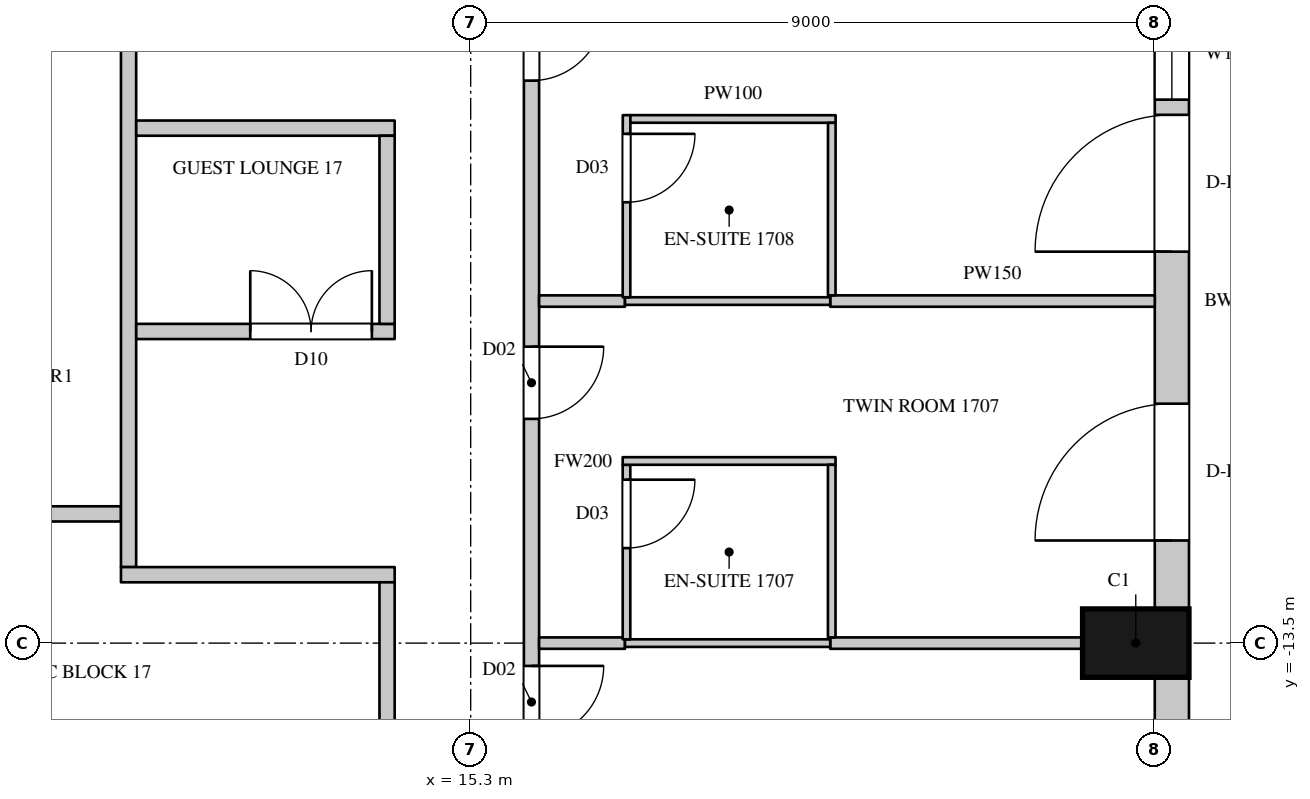
"""IFC4 building model, lengths in metres.
Left out: names, types, materials, properties, quantities, classifications, styles, units other than length and angle.
Written with IfcOpenShell. Run it as: python <this file> out.ifc"""

import sys

from ifc_helpers import new_model, si_unit, direction, frame, frame_2d, origin, origin_2d, place, context, subcontext, project, spatial, rectangle, extrude, element, fill, save


model = new_model("IFC4")
c1 = context("Model", 3, precision=1e-05, world=origin(), true_north=direction((0.0, 1.0)))
c2 = subcontext(c1, "Body", "Model", "MODEL_VIEW")
j1 = project(units=[si_unit("LENGTHUNIT", "METRE"), si_unit("PLANEANGLEUNIT", "RADIAN")], contexts=[c1])
p1 = place(None, origin())
s1 = spatial("IfcSite", under=j1, at=p1, CompositionType="ELEMENT")
p2 = place(p1, origin())
s2 = spatial("IfcBuilding", under=s1, at=p2, CompositionType="ELEMENT")
p3 = place(p2, frame((0.0, 0.0, 91.5)))
s3 = spatial("IfcBuildingStorey", under=s2, at=p3, CompositionType="ELEMENT", Elevation=91.5)
p4 = place(p3, frame((24.05, -13.5, 0.0), z_axis=(0.0, 0.0, 1.0), x_axis=(0.0, 1.0, 0.0)))
e1 = element("IfcColumn", 1, at=p4, inside=s3, PredefinedType="COLUMN", context=c2, shape_type="SweptSolid", body=[
    extrude(rectangle(XDim=0.9, YDim=1.4, at=origin_2d()), origin(), (0.0, 0.0, 1.0), 3.6),
])
p5 = place(p3, frame((24.525, -19.064, 0.0), z_axis=(0.0, 0.0, 1.0), x_axis=(0.0, 1.0, 0.0)))
e2 = element("IfcWall", 2, at=p5, inside=s3, PredefinedType="SOLIDWALL", context=c2, shape_type="SweptSolid", body=[
    extrude(rectangle(XDim=5.114, YDim=0.45, at=frame_2d((2.557, 0.0))), origin(), (0.0, 0.0, 1.0), 3.3),
])
p6 = place(p5, frame((1.114, 0.0, 1.05)))
e3 = element("IfcOpeningElement", 3, at=p6, cuts=e2, PredefinedType="OPENING", context=c2, shape_type="SweptSolid", body=[
    extrude(rectangle(XDim=2.7, YDim=2.0, at=frame_2d((1.35, 1.0))), frame((0.0, 0.235, 0.0), z_axis=(0.0, -1.0, 0.0), x_axis=(1.0, 0.0, 0.0)), (0.0, 0.0, 1.0), 0.47),
])
p7 = place(p3, frame((24.525, -13.05, 0.0), z_axis=(0.0, 0.0, 1.0), x_axis=(0.0, 1.0, 0.0)))
e4 = element("IfcWall", 4, at=p7, inside=s3, PredefinedType="SOLIDWALL", context=c2, shape_type="SweptSolid", body=[
    extrude(rectangle(XDim=8.1, YDim=0.45, at=frame_2d((4.05, 0.0))), origin(), (0.0, 0.0, 1.0), 3.3),
])
p8 = place(p7, frame((0.9, 0.0, 0.0)))
e5 = element("IfcOpeningElement", 5, at=p8, cuts=e4, PredefinedType="OPENING", context=c2, shape_type="SweptSolid", body=[
    extrude(rectangle(XDim=1.8, YDim=2.4, at=frame_2d((0.9, 1.2))), frame((0.0, 0.235, 0.0), z_axis=(0.0, -1.0, 0.0), x_axis=(1.0, 0.0, 0.0)), (0.0, 0.0, 1.0), 0.47),
])
p9 = place(p7, frame((4.7, 0.0, 0.0)))
e6 = element("IfcOpeningElement", 6, at=p9, cuts=e4, PredefinedType="OPENING", context=c2, shape_type="SweptSolid", body=[
    extrude(rectangle(XDim=1.8, YDim=2.4, at=frame_2d((0.9, 1.2))), frame((0.0, 0.235, 0.0), z_axis=(0.0, -1.0, 0.0), x_axis=(1.0, 0.0, 0.0)), (0.0, 0.0, 1.0), 0.47),
])
p10 = place(p7, frame((6.7, 0.0, 1.05)))
e7 = element("IfcOpeningElement", 7, at=p10, cuts=e4, PredefinedType="OPENING", context=c2, shape_type="SweptSolid", body=[
    extrude(rectangle(XDim=1.2, YDim=2.0, at=frame_2d((0.6, 1.0))), frame((0.0, 0.235, 0.0), z_axis=(0.0, -1.0, 0.0), x_axis=(1.0, 0.0, 0.0)), (0.0, 0.0, 1.0), 0.47),
])
p11 = place(p3, frame((-8.7, -11.8, 0.0), z_axis=(0.0, 0.0, 1.0), x_axis=(1.0, 0.0, 0.0)))
e8 = element("IfcWall", 8, at=p11, inside=s3, PredefinedType="PARTITIONING", context=c2, shape_type="SweptSolid", body=[
    extrude(rectangle(XDim=19.4, YDim=0.2, at=frame_2d((9.7, 0.0))), origin(), (0.0, 0.0, 1.0), 3.3),
])
p12 = place(p11, frame((6.95, 0.0, 0.0)))
e9 = element("IfcOpeningElement", 9, at=p12, cuts=e8, PredefinedType="OPENING", context=c2, shape_type="SweptSolid", body=[
    extrude(rectangle(XDim=1.5, YDim=2.2, at=frame_2d((0.75, 1.1))), frame((0.0, 0.11, 0.0), z_axis=(0.0, -1.0, 0.0), x_axis=(1.0, 0.0, 0.0)), (0.0, 0.0, 1.0), 0.22),
])
p13 = place(p3, frame((10.799, -12.5, 0.0), z_axis=(0.0, 0.0, 1.0), x_axis=(0.0, 1.0, 0.0)))
e10 = element("IfcWall", 10, at=p13, inside=s3, PredefinedType="PARTITIONING", context=c2, shape_type="SweptSolid", body=[
    extrude(rectangle(XDim=24.2, YDim=0.2, at=frame_2d((12.1, 0.0))), origin(), (0.0, 0.0, 1.0), 3.3),
])
p14 = place(p13, frame((13.15, 0.0, 0.0)))
e11 = element("IfcOpeningElement", 11, at=p14, cuts=e10, PredefinedType="OPENING", context=c2, shape_type="SweptSolid", body=[
    extrude(rectangle(XDim=1.5, YDim=2.2, at=frame_2d((0.75, 1.1))), frame((0.0, 0.11, 0.0), z_axis=(0.0, -1.0, 0.0), x_axis=(1.0, 0.0, 0.0)), (0.0, 0.0, 1.0), 0.22),
])
p15 = place(p3, frame((10.699, -12.6, 0.0), z_axis=(0.0, 0.0, 1.0), x_axis=(1.0, 0.0, 0.0)))
e12 = element("IfcWall", 12, at=p15, inside=s3, PredefinedType="PARTITIONING", context=c2, shape_type="SweptSolid", body=[
    extrude(rectangle(XDim=3.601, YDim=0.2, at=frame_2d((1.801, 0.0))), origin(), (0.0, 0.0, 1.0), 3.3),
])
p16 = place(p3, frame((10.9, -9.4, 0.0), z_axis=(0.0, 0.0, 1.0), x_axis=(1.0, 0.0, 0.0)))
e13 = element("IfcWall", 13, at=p16, inside=s3, PredefinedType="PARTITIONING", context=c2, shape_type="SweptSolid", body=[
    extrude(rectangle(XDim=3.4, YDim=0.2, at=frame_2d((1.7, 0.0))), origin(), (0.0, 0.0, 1.0), 3.3),
])
p17 = place(p16, frame((1.5, 0.0, 0.0)))
e14 = element("IfcOpeningElement", 14, at=p17, cuts=e13, PredefinedType="OPENING", context=c2, shape_type="SweptSolid", body=[
    extrude(rectangle(XDim=1.6, YDim=2.4, at=frame_2d((0.8, 1.2))), frame((0.0, 0.11, 0.0), z_axis=(0.0, -1.0, 0.0), x_axis=(1.0, 0.0, 0.0)), (0.0, 0.0, 1.0), 0.22),
])
p18 = place(p3, frame((10.9, -6.725, 0.0), z_axis=(0.0, 0.0, 1.0), x_axis=(1.0, 0.0, 0.0)))
e15 = element("IfcWall", 15, at=p18, inside=s3, PredefinedType="PARTITIONING", context=c2, shape_type="SweptSolid", body=[
    extrude(rectangle(XDim=3.4, YDim=0.2, at=frame_2d((1.7, 0.0))), origin(), (0.0, 0.0, 1.0), 3.3),
])
p19 = place(p3, frame((14.2, -15.5, 0.0), z_axis=(0.0, 0.0, 1.0), x_axis=(0.0, 1.0, 0.0)))
e16 = element("IfcWall", 16, at=p19, inside=s3, PredefinedType="PARTITIONING", context=c2, shape_type="SweptSolid", body=[
    extrude(rectangle(XDim=2.8, YDim=0.2, at=frame_2d((1.4, 0.0))), origin(), (0.0, 0.0, 1.0), 3.3),
])
p20 = place(p3, frame((14.2, -9.3, 0.0), z_axis=(0.0, 0.0, 1.0), x_axis=(0.0, 1.0, 0.0)))
e17 = element("IfcWall", 17, at=p20, inside=s3, PredefinedType="PARTITIONING", context=c2, shape_type="SweptSolid", body=[
    extrude(rectangle(XDim=2.475, YDim=0.2, at=frame_2d((1.238, 0.0))), origin(), (0.0, 0.0, 1.0), 3.3),
])
p21 = place(p3, frame((16.1, -17.5, 0.0), z_axis=(0.0, 0.0, 1.0), x_axis=(0.0, 1.0, 0.0)))
e18 = element("IfcWall", 18, at=p21, inside=s3, PredefinedType="PARTITIONING", context=c2, shape_type="SweptSolid", body=[
    extrude(rectangle(XDim=12.75, YDim=0.2, at=frame_2d((6.375, 0.0))), origin(), (0.0, 0.0, 1.0), 3.3),
])
p22 = place(p21, frame((2.75, 0.0, 0.0)))
e19 = element("IfcOpeningElement", 19, at=p22, cuts=e18, PredefinedType="OPENING", context=c2, shape_type="SweptSolid", body=[
    extrude(rectangle(XDim=0.95, YDim=2.2, at=frame_2d((0.475, 1.1))), frame((0.0, 0.11, 0.0), z_axis=(0.0, -1.0, 0.0), x_axis=(1.0, 0.0, 0.0)), (0.0, 0.0, 1.0), 0.22),
])
p23 = place(p21, frame((6.95, 0.0, 0.0)))
e20 = element("IfcOpeningElement", 20, at=p23, cuts=e18, PredefinedType="OPENING", context=c2, shape_type="SweptSolid", body=[
    extrude(rectangle(XDim=0.95, YDim=2.2, at=frame_2d((0.475, 1.1))), frame((0.0, 0.11, 0.0), z_axis=(0.0, -1.0, 0.0), x_axis=(1.0, 0.0, 0.0)), (0.0, 0.0, 1.0), 0.22),
])
p24 = place(p21, frame((11.4, 0.0, 0.0)))
e21 = element("IfcOpeningElement", 21, at=p24, cuts=e18, PredefinedType="OPENING", context=c2, shape_type="SweptSolid", body=[
    extrude(rectangle(XDim=0.95, YDim=2.2, at=frame_2d((0.475, 1.1))), frame((0.0, 0.11, 0.0), z_axis=(0.0, -1.0, 0.0), x_axis=(1.0, 0.0, 0.0)), (0.0, 0.0, 1.0), 0.22),
])
p25 = place(p3, frame((16.2, -13.5, 0.0), z_axis=(0.0, 0.0, 1.0), x_axis=(1.0, 0.0, 0.0)))
e22 = element("IfcWall", 22, at=p25, inside=s3, PredefinedType="PARTITIONING", context=c2, shape_type="SweptSolid", body=[
    extrude(rectangle(XDim=1.13, YDim=0.15, at=frame_2d((0.565, 0.0))), origin(), (0.0, 0.0, 1.0), 3.3),
])
p26 = place(p3, frame((16.2, -9.0, 0.0), z_axis=(0.0, 0.0, 1.0), x_axis=(1.0, 0.0, 0.0)))
e23 = element("IfcWall", 23, at=p26, inside=s3, PredefinedType="PARTITIONING", context=c2, shape_type="SweptSolid", body=[
    extrude(rectangle(XDim=1.13, YDim=0.15, at=frame_2d((0.565, 0.0))), origin(), (0.0, 0.0, 1.0), 2.65),
])
p27 = place(p3, frame((20.03, -13.5, 0.0), z_axis=(0.0, 0.0, 1.0), x_axis=(1.0, 0.0, 0.0)))
e24 = element("IfcWall", 24, at=p27, inside=s3, PredefinedType="PARTITIONING", context=c2, shape_type="SweptSolid", body=[
    extrude(rectangle(XDim=3.32, YDim=0.15, at=frame_2d((1.66, 0.0))), origin(), (0.0, 0.0, 1.0), 3.3),
])
p28 = place(p3, frame((20.03, -9.0, 0.0), z_axis=(0.0, 0.0, 1.0), x_axis=(1.0, 0.0, 0.0)))
e25 = element("IfcWall", 25, at=p28, inside=s3, PredefinedType="PARTITIONING", context=c2, shape_type="SweptSolid", body=[
    extrude(rectangle(XDim=4.27, YDim=0.15, at=frame_2d((2.135, 0.0))), origin(), (0.0, 0.0, 1.0), 2.65),
])
p29 = place(p3, frame((17.33, -13.5, 0.0), z_axis=(0.0, 0.0, 1.0), x_axis=(1.0, 0.0, 0.0)))
e26 = element("IfcWall", 26, at=p29, inside=s3, PredefinedType="PARTITIONING", context=c2, shape_type="SweptSolid", body=[
    extrude(rectangle(XDim=2.7, YDim=0.1, at=frame_2d((1.35, 0.0))), origin(), (0.0, 0.0, 1.0), 3.3),
])
p30 = place(p3, frame((17.33, -9.0, 0.0), z_axis=(0.0, 0.0, 1.0), x_axis=(1.0, 0.0, 0.0)))
e27 = element("IfcWall", 27, at=p30, inside=s3, PredefinedType="PARTITIONING", context=c2, shape_type="SweptSolid", body=[
    extrude(rectangle(XDim=2.7, YDim=0.1, at=frame_2d((1.35, 0.0))), origin(), (0.0, 0.0, 1.0), 2.65),
])
p31 = place(p3, frame((17.35, -13.45, 0.0), z_axis=(0.0, 0.0, 1.0), x_axis=(0.0, 1.0, 0.0)))
e28 = element("IfcWall", 28, at=p31, inside=s3, PredefinedType="PARTITIONING", context=c2, shape_type="SweptSolid", body=[
    extrude(rectangle(XDim=2.296, YDim=0.1, at=frame_2d((1.148, 0.0))), origin(), (0.0, 0.0, 1.0), 3.3),
])
p32 = place(p31, frame((1.2, 0.0, 0.0)))
e29 = element("IfcOpeningElement", 29, at=p32, cuts=e28, PredefinedType="OPENING", context=c2, shape_type="SweptSolid", body=[
    extrude(rectangle(XDim=0.9, YDim=2.2, at=frame_2d((0.45, 1.1))), frame((0.0, 0.06, 0.0), z_axis=(0.0, -1.0, 0.0), x_axis=(1.0, 0.0, 0.0)), (0.0, 0.0, 1.0), 0.12),
])
p33 = place(p3, frame((17.3, -11.104, 0.0), z_axis=(0.0, 0.0, 1.0), x_axis=(1.0, 0.0, 0.0)))
e30 = element("IfcWall", 30, at=p33, inside=s3, PredefinedType="PARTITIONING", context=c2, shape_type="SweptSolid", body=[
    extrude(rectangle(XDim=2.8, YDim=0.1, at=frame_2d((1.4, 0.0))), origin(), (0.0, 0.0, 1.0), 3.3),
])
p34 = place(p3, frame((17.35, -8.95, 0.0), z_axis=(0.0, 0.0, 1.0), x_axis=(0.000407580973, 0.999999916939, 0.0)))
e31 = element("IfcWall", 31, at=p34, inside=s3, PredefinedType="PARTITIONING", context=c2, shape_type="SweptSolid", body=[
    extrude(rectangle(XDim=2.396, YDim=0.1, at=frame_2d((1.198, 0.0))), origin(), (0.0, 0.0, 1.0), 3.3),
])
p35 = place(p34, frame((1.25, 0.0, 0.0)))
e32 = element("IfcOpeningElement", 32, at=p35, cuts=e31, PredefinedType="OPENING", context=c2, shape_type="SweptSolid", body=[
    extrude(rectangle(XDim=0.9, YDim=2.2, at=frame_2d((0.45, 1.1))), frame((0.0, 0.06, 0.0), z_axis=(0.0, -1.0, 0.0), x_axis=(1.0, 0.0, 0.0)), (0.0, 0.0, 1.0), 0.12),
])
p36 = place(p3, frame((17.401, -6.604, 0.0), z_axis=(0.0, 0.0, 1.0), x_axis=(0.9999999346, -0.000361663629, 0.0)))
e33 = element("IfcWall", 33, at=p36, inside=s3, PredefinedType="PARTITIONING", context=c2, shape_type="SweptSolid", body=[
    extrude(rectangle(XDim=2.7, YDim=0.1, at=frame_2d((1.35, 0.0))), origin(), (0.0, 0.0, 1.0), 3.3),
])
p37 = place(p3, frame((20.05, -13.425, 0.0), z_axis=(0.0, 0.0, 1.0), x_axis=(0.0, 1.0, 0.0)))
e34 = element("IfcWall", 34, at=p37, inside=s3, PredefinedType="PARTITIONING", context=c2, shape_type="SweptSolid", body=[
    extrude(rectangle(XDim=2.271, YDim=0.1, at=frame_2d((1.135, 0.0))), origin(), (0.0, 0.0, 1.0), 3.3),
])
p38 = place(p3, frame((20.05, -8.925, 0.0), z_axis=(0.0, 0.0, 1.0), x_axis=(0.000430200003, 0.999999907464, 0.0)))
e35 = element("IfcWall", 35, at=p38, inside=s3, PredefinedType="PARTITIONING", context=c2, shape_type="SweptSolid", body=[
    extrude(rectangle(XDim=2.27, YDim=0.1, at=frame_2d((1.135, 0.0))), origin(), (0.0, 0.0, 1.0), 3.3),
])
p39 = place(p8, origin())
e36 = element("IfcDoor", 36, at=p39, inside=s3, OperationType="SLIDING_TO_LEFT", PredefinedType="DOOR", context=c2, shape_type="SweptSolid", body=[
    extrude(rectangle(XDim=1.8, YDim=2.4, at=frame_2d((0.9, 1.2))), frame((0.0, 0.13, 0.0), z_axis=(0.0, -1.0, 0.0), x_axis=(1.0, 0.0, 0.0)), (0.0, 0.0, 1.0), 0.05),
])
fill(e5, e36)
p40 = place(p9, origin())
e37 = element("IfcDoor", 37, at=p40, inside=s3, OperationType="SLIDING_TO_LEFT", PredefinedType="DOOR", context=c2, shape_type="SweptSolid", body=[
    extrude(rectangle(XDim=1.8, YDim=2.4, at=frame_2d((0.9, 1.2))), frame((0.0, 0.13, 0.0), z_axis=(0.0, -1.0, 0.0), x_axis=(1.0, 0.0, 0.0)), (0.0, 0.0, 1.0), 0.05),
])
fill(e6, e37)
p41 = place(p10, origin())
e38 = element("IfcWindow", 38, at=p41, inside=s3, PartitioningType="SINGLE_PANEL", PredefinedType="WINDOW", context=c2, shape_type="SweptSolid", body=[
    extrude(rectangle(XDim=1.2, YDim=2.0, at=frame_2d((0.6, 1.0))), frame((0.0, 0.135, 0.0), z_axis=(0.0, -1.0, 0.0), x_axis=(1.0, 0.0, 0.0)), (0.0, 0.0, 1.0), 0.06),
])
fill(e7, e38)
p42 = place(p17, origin())
e39 = element("IfcDoor", 39, at=p42, inside=s3, OperationType="DOUBLE_DOOR_SINGLE_SWING", PredefinedType="DOOR", context=c2, shape_type="SweptSolid", body=[
    extrude(rectangle(XDim=1.6, YDim=2.4, at=frame_2d((0.8, 1.2))), frame((0.0, 0.025, 0.0), z_axis=(0.0, -1.0, 0.0), x_axis=(1.0, 0.0, 0.0)), (0.0, 0.0, 1.0), 0.05),
])
fill(e14, e39)
p43 = place(p22, origin())
e40 = element("IfcDoor", 40, at=p43, inside=s3, OperationType="SINGLE_SWING_LEFT", PredefinedType="DOOR", context=c2, shape_type="SweptSolid", body=[
    extrude(rectangle(XDim=0.95, YDim=2.2, at=frame_2d((0.475, 1.1))), frame((0.0, 0.025, 0.0), z_axis=(0.0, -1.0, 0.0), x_axis=(1.0, 0.0, 0.0)), (0.0, 0.0, 1.0), 0.05),
])
fill(e19, e40)
p44 = place(p23, origin())
e41 = element("IfcDoor", 41, at=p44, inside=s3, OperationType="SINGLE_SWING_LEFT", PredefinedType="DOOR", context=c2, shape_type="SweptSolid", body=[
    extrude(rectangle(XDim=0.95, YDim=2.2, at=frame_2d((0.475, 1.1))), frame((0.0, 0.025, 0.0), z_axis=(0.0, -1.0, 0.0), x_axis=(1.0, 0.0, 0.0)), (0.0, 0.0, 1.0), 0.05),
])
fill(e20, e41)
p45 = place(p32, origin())
e42 = element("IfcDoor", 42, at=p45, inside=s3, OperationType="SINGLE_SWING_LEFT", PredefinedType="DOOR", context=c2, shape_type="SweptSolid", body=[
    extrude(rectangle(XDim=0.9, YDim=2.2, at=frame_2d((0.45, 1.1))), frame((0.0, 0.025, 0.0), z_axis=(0.0, -1.0, 0.0), x_axis=(1.0, 0.0, 0.0)), (0.0, 0.0, 1.0), 0.05),
])
fill(e29, e42)
p46 = place(p24, origin())
e43 = element("IfcDoor", 43, at=p46, inside=s3, OperationType="SINGLE_SWING_LEFT", PredefinedType="DOOR", context=c2, shape_type="SweptSolid", body=[
    extrude(rectangle(XDim=0.95, YDim=2.2, at=frame_2d((0.475, 1.1))), frame((0.0, 0.025, 0.0), z_axis=(0.0, -1.0, 0.0), x_axis=(1.0, 0.0, 0.0)), (0.0, 0.0, 1.0), 0.05),
])
fill(e21, e43)
p47 = place(p35, origin())
e44 = element("IfcDoor", 44, at=p47, inside=s3, OperationType="SINGLE_SWING_LEFT", PredefinedType="DOOR", context=c2, shape_type="SweptSolid", body=[
    extrude(rectangle(XDim=0.9, YDim=2.2, at=frame_2d((0.45, 1.1))), frame((0.0, 0.025, 0.0), z_axis=(0.0, -1.0, 0.0), x_axis=(1.0, 0.0, 0.0)), (0.0, 0.0, 1.0), 0.05),
])
fill(e32, e44)
save(model, sys.argv[1])
